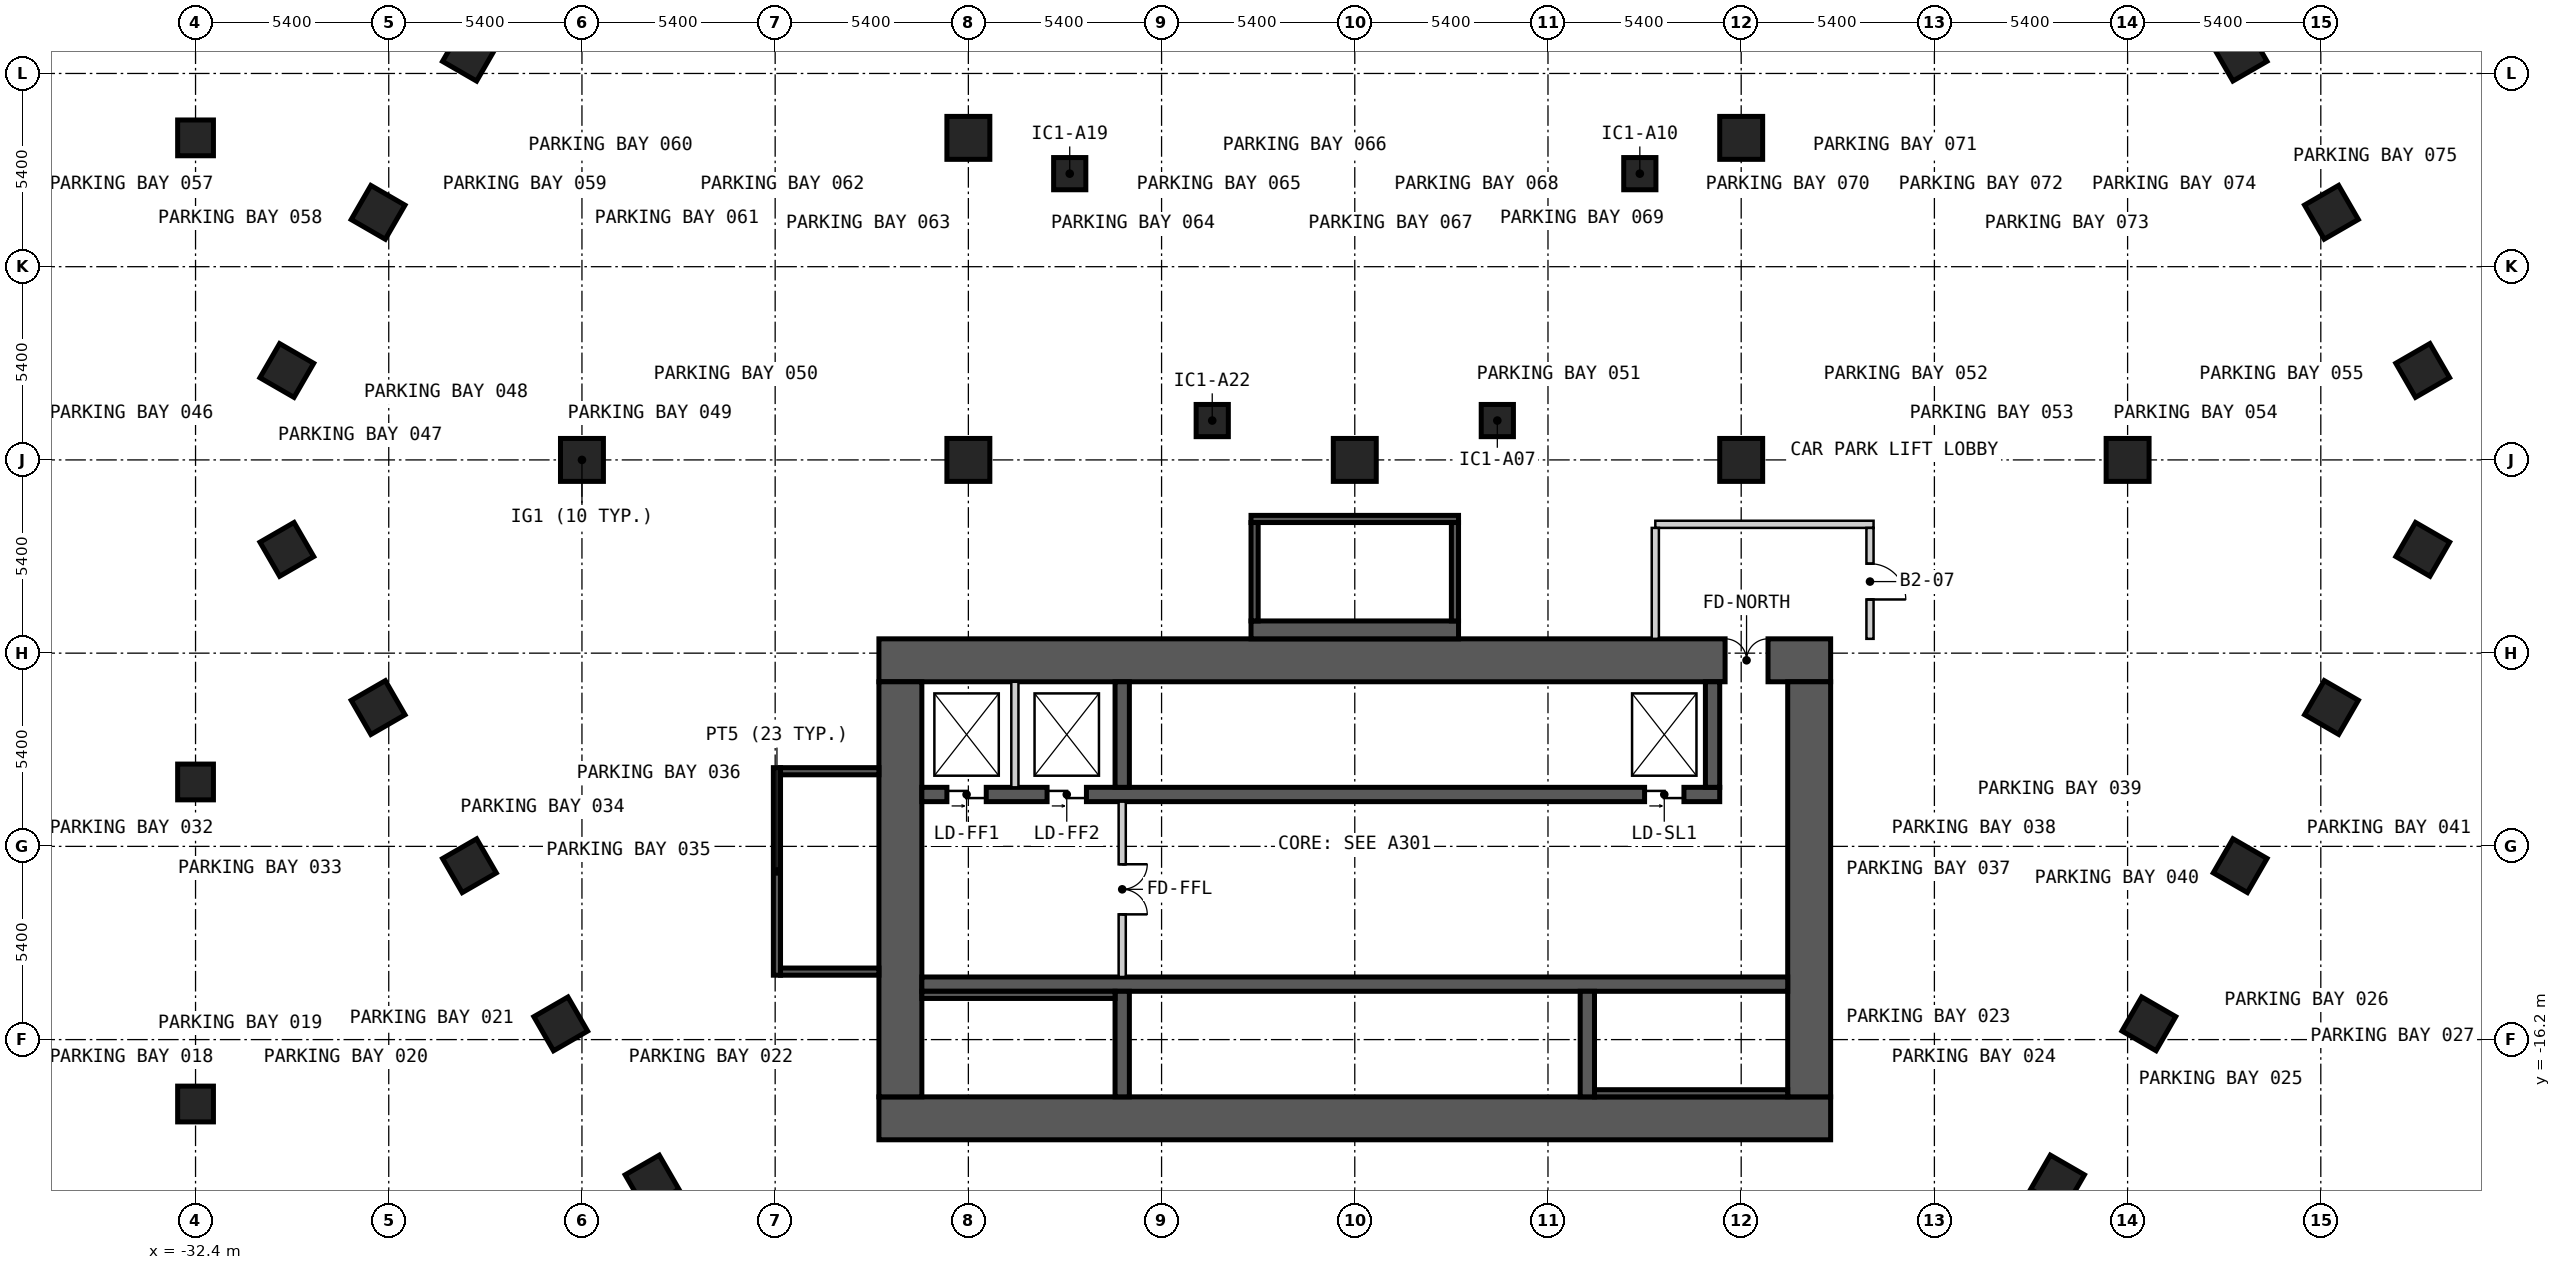
"""IFC4 building model, lengths in metres.
Left out: names, types, materials, properties, quantities, classifications, styles, units other than length and angle.
Written with IfcOpenShell. Run it as: python <this file> out.ifc"""

import sys

from ifc_helpers import new_model, si_unit, direction, frame, frame_2d, origin, origin_2d, place, context, subcontext, project, spatial, rectangle, extrude, element, fill, save


model = new_model("IFC4")
c1 = context("Model", 3, precision=1e-05, world=origin(), true_north=direction((0.0, 1.0)))
c2 = subcontext(c1, "Body", "Model", "MODEL_VIEW")
j1 = project(units=[si_unit("LENGTHUNIT", "METRE"), si_unit("PLANEANGLEUNIT", "RADIAN")], contexts=[c1])
p1 = place(None, origin())
s1 = spatial("IfcSite", under=j1, at=p1, CompositionType="ELEMENT")
p2 = place(p1, origin())
s2 = spatial("IfcBuilding", under=s1, at=p2, CompositionType="ELEMENT")
p3 = place(p2, frame((0.0, 0.0, -8.4)))
s3 = spatial("IfcBuildingStorey", under=s2, at=p3, CompositionType="ELEMENT", Elevation=-8.4)
for number, where, z_axis, x_axis in (
    (1, (-24.746, 11.339, -0.35), (0.0, 0.0, 1.0), (-0.5, -0.866, 0.0)),
    (2, (-27.298, 6.919, -0.35), (0.0, 0.0, 1.0), (-0.5, -0.866, 0.0)),
    (3, (-29.849, 2.499, -0.35), (0.0, 0.0, 1.0), (-0.5, -0.866, 0.0)),
    (4, (-29.848, -2.5, -0.35), (0.0, 0.0, 1.0), (0.5, -0.866, 0.0)),
    (5, (-27.297, -6.921, -0.35), (0.0, 0.0, 1.0), (0.5, -0.866, 0.0)),
    (6, (-24.745, -11.341, -0.35), (0.0, 0.0, 1.0), (0.5, -0.866, 0.0)),
    (7, (-22.193, -15.761, -0.35), (0.0, 0.0, 1.0), (0.5, -0.866, 0.0)),
    (8, (-19.641, -20.181, -0.35), (0.0, 0.0, 1.0), (0.5, -0.866, 0.0)),
    (9, (19.642, -20.18, -0.35), (0.0, 0.0, 1.0), (0.5, 0.866, 0.0)),
    (10, (22.194, -15.759, -0.35), (0.0, 0.0, 1.0), (0.5, 0.866, 0.0)),
    (11, (24.746, -11.339, -0.35), (0.0, 0.0, 1.0), (0.5, 0.866, 0.0)),
    (12, (27.298, -6.919, -0.35), (0.0, 0.0, 1.0), (0.5, 0.866, 0.0)),
    (13, (29.849, -2.499, -0.35), (0.0, 0.0, 1.0), (0.5, 0.866, 0.0)),
    (14, (29.848, 2.5, -0.35), (0.0, 0.0, 1.0), (-0.5, 0.866, 0.0)),
    (15, (27.297, 6.921, -0.35), (0.0, 0.0, 1.0), (-0.5, 0.866, 0.0)),
    (16, (24.745, 11.341, -0.35), (0.0, 0.0, 1.0), (-0.5, 0.866, 0.0)),
):
    element("IfcColumn", number, at=place(p3, frame(where, z_axis=z_axis, x_axis=x_axis)), inside=s3, PredefinedType="COLUMN", context=c2, shape_type="SweptSolid", body=[
        extrude(rectangle(XDim=1.1, YDim=1.1, at=origin_2d()), origin(), (0.0, 0.0, 1.0), 4.55),
    ])
for number, where, z_axis, x_axis in (
    (17, (3.984, 1.1, -0.35), (0.0, 0.0, 1.0), (1.0, 0.0, 0.0)),
    (18, (7.967, 8.0, -0.35), (0.0, 0.0, 1.0), (1.0, 0.0, 0.0)),
    (19, (-7.967, 8.0, -0.35), (0.0, 0.0, 1.0), (1.0, 0.0, 0.0)),
    (20, (-3.984, 1.1, -0.35), (0.0, 0.0, 1.0), (1.0, 0.0, 0.0)),
):
    element("IfcColumn", number, at=place(p3, frame(where, z_axis=z_axis, x_axis=x_axis)), inside=s3, PredefinedType="COLUMN", context=c2, shape_type="SweptSolid", body=[
        extrude(rectangle(XDim=0.9, YDim=0.9, at=origin_2d()), origin(), (0.0, 0.0, 1.0), 4.55),
    ])
for number, where, z_axis, x_axis in (
    (21, (-21.6, 0.0, -0.35), (0.0, 0.0, 1.0), (1.0, 0.0, 0.0)),
    (22, (-10.8, 0.0, -0.35), (0.0, 0.0, 1.0), (1.0, 0.0, 0.0)),
    (23, (-10.8, 9.0, -0.35), (0.0, 0.0, 1.0), (1.0, 0.0, 0.0)),
    (24, (0.0, 0.0, -0.35), (0.0, 0.0, 1.0), (1.0, 0.0, 0.0)),
    (25, (10.8, 0.0, -0.35), (0.0, 0.0, 1.0), (1.0, 0.0, 0.0)),
    (26, (10.8, 9.0, -0.35), (0.0, 0.0, 1.0), (1.0, 0.0, 0.0)),
    (27, (21.6, 0.0, -0.35), (0.0, 0.0, 1.0), (1.0, 0.0, 0.0)),
):
    element("IfcColumn", number, at=place(p3, frame(where, z_axis=z_axis, x_axis=x_axis)), inside=s3, PredefinedType="COLUMN", context=c2, shape_type="SweptSolid", body=[
        extrude(rectangle(XDim=1.2, YDim=1.2, at=origin_2d()), origin(), (0.0, 0.0, 1.0), 4.55),
    ])
for number, where, z_axis, x_axis in (
    (28, (-32.4, -18.0, -0.35), (0.0, 0.0, 1.0), (1.0, 0.0, 0.0)),
    (29, (-32.4, -9.0, -0.35), (0.0, 0.0, 1.0), (1.0, 0.0, 0.0)),
    (30, (-32.4, 9.0, -0.35), (0.0, 0.0, 1.0), (1.0, 0.0, 0.0)),
):
    element("IfcColumn", number, at=place(p3, frame(where, z_axis=z_axis, x_axis=x_axis)), inside=s3, PredefinedType="COLUMN", context=c2, shape_type="SweptSolid", body=[
        extrude(rectangle(XDim=1.0, YDim=1.0, at=origin_2d()), origin(), (0.0, 0.0, 1.0), 4.55),
    ])
p4 = place(p3, frame((-13.3, -18.4, 0.0), z_axis=(0.0, 0.0, 1.0), x_axis=(1.0, 0.0, 0.0)))
e31 = element("IfcWall", 31, at=p4, inside=s3, PredefinedType="SHEAR", context=c2, shape_type="SweptSolid", body=[
    extrude(rectangle(XDim=26.6, YDim=1.2, at=frame_2d((13.3, 0.0))), origin(), (0.0, 0.0, 1.0), 3.85),
])
p5 = place(p3, frame((-13.3, -5.6, 0.0), z_axis=(0.0, 0.0, 1.0), x_axis=(1.0, 0.0, 0.0)))
e32 = element("IfcWall", 32, at=p5, inside=s3, PredefinedType="SHEAR", context=c2, shape_type="SweptSolid", body=[
    extrude(rectangle(XDim=26.6, YDim=1.2, at=frame_2d((13.3, 0.0))), origin(), (0.0, 0.0, 1.0), 3.85),
])
p6 = place(p5, frame((23.65, 0.0, 0.0)))
e33 = element("IfcOpeningElement", 33, at=p6, cuts=e32, PredefinedType="OPENING", context=c2, shape_type="SweptSolid", body=[
    extrude(rectangle(XDim=1.2, YDim=2.1, at=frame_2d((0.6, 1.05))), frame((0.0, 0.61, 0.0), z_axis=(0.0, -1.0, 0.0), x_axis=(1.0, 0.0, 0.0)), (0.0, 0.0, 1.0), 1.22),
])
for number, where, z_axis, x_axis in (
    (34, (-12.7, -17.8, 0.0), (0.0, 0.0, 1.0), (0.0, 1.0, 0.0)),
    (35, (12.7, -17.8, 0.0), (0.0, 0.0, 1.0), (0.0, 1.0, 0.0)),
):
    element("IfcWall", number, at=place(p3, frame(where, z_axis=z_axis, x_axis=x_axis)), inside=s3, PredefinedType="SHEAR", context=c2, shape_type="SweptSolid", body=[
        extrude(rectangle(XDim=11.6, YDim=1.2, at=frame_2d((5.8, 0.0))), origin(), (0.0, 0.0, 1.0), 3.85),
    ])
p7 = place(p3, frame((-12.1, -14.65, 0.0), z_axis=(0.0, 0.0, 1.0), x_axis=(1.0, 0.0, 0.0)))
e36 = element("IfcWall", 36, at=p7, inside=s3, PredefinedType="SHEAR", context=c2, shape_type="SweptSolid", body=[
    extrude(rectangle(XDim=24.2, YDim=0.4, at=frame_2d((12.1, 0.0))), origin(), (0.0, 0.0, 1.0), 3.85),
])
p8 = place(p3, frame((-12.1, -9.35, 0.0), z_axis=(0.0, 0.0, 1.0), x_axis=(1.0, 0.0, 0.0)))
e37 = element("IfcWall", 37, at=p8, inside=s3, PredefinedType="SHEAR", context=c2, shape_type="SweptSolid", body=[
    extrude(rectangle(XDim=22.3, YDim=0.4, at=frame_2d((11.15, 0.0))), origin(), (0.0, 0.0, 1.0), 3.85),
])
p9 = place(p8, frame((0.7, 0.0, 0.0)))
e38 = element("IfcOpeningElement", 38, at=p9, cuts=e37, PredefinedType="OPENING", context=c2, shape_type="SweptSolid", body=[
    extrude(rectangle(XDim=1.1, YDim=2.1, at=frame_2d((0.55, 1.05))), frame((0.0, 0.21, 0.0), z_axis=(0.0, -1.0, 0.0), x_axis=(1.0, 0.0, 0.0)), (0.0, 0.0, 1.0), 0.42),
])
p10 = place(p8, frame((3.5, 0.0, 0.0)))
e39 = element("IfcOpeningElement", 39, at=p10, cuts=e37, PredefinedType="OPENING", context=c2, shape_type="SweptSolid", body=[
    extrude(rectangle(XDim=1.1, YDim=2.1, at=frame_2d((0.55, 1.05))), frame((0.0, 0.21, 0.0), z_axis=(0.0, -1.0, 0.0), x_axis=(1.0, 0.0, 0.0)), (0.0, 0.0, 1.0), 0.42),
])
p11 = place(p8, frame((20.2, 0.0, 0.0)))
e40 = element("IfcOpeningElement", 40, at=p11, cuts=e37, PredefinedType="OPENING", context=c2, shape_type="SweptSolid", body=[
    extrude(rectangle(XDim=1.1, YDim=2.1, at=frame_2d((0.55, 1.05))), frame((0.0, 0.21, 0.0), z_axis=(0.0, -1.0, 0.0), x_axis=(1.0, 0.0, 0.0)), (0.0, 0.0, 1.0), 0.42),
])
for number, where, z_axis, x_axis in (
    (41, (-6.5, -17.8, 0.0), (0.0, 0.0, 1.0), (0.0, 1.0, 0.0)),
    (42, (6.5, -17.8, 0.0), (0.0, 0.0, 1.0), (0.0, 1.0, 0.0)),
    (43, (-6.5, -9.15, 0.0), (0.0, 0.0, 1.0), (0.0, 1.0, 0.0)),
    (44, (10.0, -9.15, 0.0), (0.0, 0.0, 1.0), (0.0, 1.0, 0.0)),
):
    element("IfcWall", number, at=place(p3, frame(where, z_axis=z_axis, x_axis=x_axis)), inside=s3, PredefinedType="SHEAR", context=c2, shape_type="SweptSolid", body=[
        extrude(rectangle(XDim=2.95, YDim=0.4, at=frame_2d((1.475, 0.0))), origin(), (0.0, 0.0, 1.0), 3.85),
    ])
p12 = place(p3, frame((8.4, -1.8, 0.0), z_axis=(0.0, 0.0, 1.0), x_axis=(1.0, 0.0, 0.0)))
e45 = element("IfcWall", 45, at=p12, inside=s3, PredefinedType="PARTITIONING", context=c2, shape_type="SweptSolid", body=[
    extrude(rectangle(XDim=6.1, YDim=0.2, at=frame_2d((3.05, 0.0))), origin(), (0.0, 0.0, 1.0), 3.85),
])
p13 = place(p3, frame((8.4, -5.0, 0.0), z_axis=(0.0, 0.0, 1.0), x_axis=(0.0, 1.0, 0.0)))
e46 = element("IfcWall", 46, at=p13, inside=s3, PredefinedType="PARTITIONING", context=c2, shape_type="SweptSolid", body=[
    extrude(rectangle(XDim=3.1, YDim=0.2, at=frame_2d((1.55, 0.0))), origin(), (0.0, 0.0, 1.0), 3.85),
])
p14 = place(p3, frame((14.4, -5.0, 0.0), z_axis=(0.0, 0.0, 1.0), x_axis=(0.0, 1.0, 0.0)))
e47 = element("IfcWall", 47, at=p14, inside=s3, PredefinedType="PARTITIONING", context=c2, shape_type="SweptSolid", body=[
    extrude(rectangle(XDim=3.1, YDim=0.2, at=frame_2d((1.55, 0.0))), origin(), (0.0, 0.0, 1.0), 3.85),
])
p15 = place(p14, frame((2.1, 0.0, 0.0), z_axis=(0.0, 0.0, 1.0), x_axis=(-1.0, 0.0, 0.0)))
e48 = element("IfcOpeningElement", 48, at=p15, cuts=e47, PredefinedType="OPENING", context=c2, shape_type="SweptSolid", body=[
    extrude(rectangle(XDim=1.0, YDim=2.1, at=frame_2d((0.5, 1.05))), frame((0.0, 0.11, 0.0), z_axis=(0.0, -1.0, 0.0), x_axis=(1.0, 0.0, 0.0)), (0.0, 0.0, 1.0), 0.22),
])
p16 = place(p3, frame((-16.15, -14.4, 0.0), z_axis=(0.0, 0.0, 1.0), x_axis=(0.0, 1.0, 0.0)))
e49 = element("IfcWall", 49, at=p16, inside=s3, PredefinedType="SOLIDWALL", context=c2, shape_type="SweptSolid", body=[
    extrude(rectangle(XDim=5.8, YDim=0.2, at=frame_2d((2.9, 0.0))), origin(), (0.0, 0.0, 1.0), 3.85),
])
for number, where, z_axis, x_axis in (
    (50, (-16.05, -14.3, 0.0), (0.0, 0.0, 1.0), (1.0, 0.0, 0.0)),
    (51, (-16.05, -8.7, 0.0), (0.0, 0.0, 1.0), (1.0, 0.0, 0.0)),
):
    element("IfcWall", number, at=place(p3, frame(where, z_axis=z_axis, x_axis=x_axis)), inside=s3, PredefinedType="SOLIDWALL", context=c2, shape_type="SweptSolid", body=[
        extrude(rectangle(XDim=2.75, YDim=0.2, at=frame_2d((1.375, 0.0))), origin(), (0.0, 0.0, 1.0), 3.85),
    ])
p17 = place(p3, frame((-12.1, -14.95, 0.0), z_axis=(0.0, 0.0, 1.0), x_axis=(1.0, 0.0, 0.0)))
e52 = element("IfcWall", 52, at=p17, inside=s3, PredefinedType="SOLIDWALL", context=c2, shape_type="SweptSolid", body=[
    extrude(rectangle(XDim=5.4, YDim=0.2, at=frame_2d((2.7, 0.0))), origin(), (0.0, 0.0, 1.0), 3.85),
])
p18 = place(p3, frame((-9.5, -9.15, 0.0), z_axis=(0.0, 0.0, 1.0), x_axis=(0.0, 1.0, 0.0)))
e53 = element("IfcWall", 53, at=p18, inside=s3, PredefinedType="SOLIDWALL", context=c2, shape_type="SweptSolid", body=[
    extrude(rectangle(XDim=2.95, YDim=0.2, at=frame_2d((1.475, 0.0))), origin(), (0.0, 0.0, 1.0), 3.85),
])
p19 = place(p3, frame((-6.5, -14.45, 0.0), z_axis=(0.0, 0.0, 1.0), x_axis=(0.0, 1.0, 0.0)))
e54 = element("IfcWall", 54, at=p19, inside=s3, PredefinedType="PARTITIONING", context=c2, shape_type="SweptSolid", body=[
    extrude(rectangle(XDim=4.9, YDim=0.2, at=frame_2d((2.45, 0.0))), origin(), (0.0, 0.0, 1.0), 3.85),
])
p20 = place(p19, frame((3.15, 0.0, 0.0), z_axis=(0.0, 0.0, 1.0), x_axis=(-1.0, 0.0, 0.0)))
e55 = element("IfcOpeningElement", 55, at=p20, cuts=e54, PredefinedType="OPENING", context=c2, shape_type="SweptSolid", body=[
    extrude(rectangle(XDim=1.4, YDim=2.1, at=frame_2d((0.7, 1.05))), frame((0.0, 0.11, 0.0), z_axis=(0.0, -1.0, 0.0), x_axis=(1.0, 0.0, 0.0)), (0.0, 0.0, 1.0), 0.22),
])
p21 = place(p3, frame((6.7, -17.7, 0.0), z_axis=(0.0, 0.0, 1.0), x_axis=(1.0, 0.0, 0.0)))
e56 = element("IfcWall", 56, at=p21, inside=s3, PredefinedType="SOLIDWALL", context=c2, shape_type="SweptSolid", body=[
    extrude(rectangle(XDim=5.4, YDim=0.2, at=frame_2d((2.7, 0.0))), origin(), (0.0, 0.0, 1.0), 3.85),
])
p22 = place(p3, frame((-2.9, -4.75, 0.0), z_axis=(0.0, 0.0, 1.0), x_axis=(1.0, 0.0, 0.0)))
e57 = element("IfcWall", 57, at=p22, inside=s3, PredefinedType="SOLIDWALL", context=c2, shape_type="SweptSolid", body=[
    extrude(rectangle(XDim=5.8, YDim=0.5, at=frame_2d((2.9, 0.0))), origin(), (0.0, 0.0, 1.0), 3.85),
])
p23 = place(p3, frame((-2.9, -1.65, 0.0), z_axis=(0.0, 0.0, 1.0), x_axis=(1.0, 0.0, 0.0)))
e58 = element("IfcWall", 58, at=p23, inside=s3, PredefinedType="SOLIDWALL", context=c2, shape_type="SweptSolid", body=[
    extrude(rectangle(XDim=5.8, YDim=0.2, at=frame_2d((2.9, 0.0))), origin(), (0.0, 0.0, 1.0), 3.85),
])
for number, where, z_axis, x_axis in (
    (59, (-2.8, -4.5, 0.0), (0.0, 0.0, 1.0), (0.0, 1.0, 0.0)),
    (60, (2.8, -4.5, 0.0), (0.0, 0.0, 1.0), (0.0, 1.0, 0.0)),
):
    element("IfcWall", number, at=place(p3, frame(where, z_axis=z_axis, x_axis=x_axis)), inside=s3, PredefinedType="SOLIDWALL", context=c2, shape_type="SweptSolid", body=[
        extrude(rectangle(XDim=2.75, YDim=0.2, at=frame_2d((1.375, 0.0))), origin(), (0.0, 0.0, 1.0), 3.85),
    ])
p24 = place(p15, origin())
e61 = element("IfcDoor", 61, at=p24, inside=s3, OperationType="SINGLE_SWING_RIGHT", PredefinedType="DOOR", context=c2, shape_type="SweptSolid", body=[
    extrude(rectangle(XDim=1.0, YDim=2.1, at=frame_2d((0.5, 1.05))), frame((0.0, 0.025, 0.0), z_axis=(0.0, -1.0, 0.0), x_axis=(1.0, 0.0, 0.0)), (0.0, 0.0, 1.0), 0.05),
])
fill(e48, e61)
p25 = place(p9, origin())
e62 = element("IfcDoor", 62, at=p25, inside=s3, OperationType="DOUBLE_DOOR_SLIDING", PredefinedType="DOOR", context=c2, shape_type="SweptSolid", body=[
    extrude(rectangle(XDim=1.1, YDim=2.1, at=frame_2d((0.55, 1.05))), frame((0.0, 0.025, 0.0), z_axis=(0.0, -1.0, 0.0), x_axis=(1.0, 0.0, 0.0)), (0.0, 0.0, 1.0), 0.05),
])
fill(e38, e62)
p26 = place(p10, origin())
e63 = element("IfcDoor", 63, at=p26, inside=s3, OperationType="DOUBLE_DOOR_SLIDING", PredefinedType="DOOR", context=c2, shape_type="SweptSolid", body=[
    extrude(rectangle(XDim=1.1, YDim=2.1, at=frame_2d((0.55, 1.05))), frame((0.0, 0.025, 0.0), z_axis=(0.0, -1.0, 0.0), x_axis=(1.0, 0.0, 0.0)), (0.0, 0.0, 1.0), 0.05),
])
fill(e39, e63)
p27 = place(p11, origin())
e64 = element("IfcDoor", 64, at=p27, inside=s3, OperationType="DOUBLE_DOOR_SLIDING", PredefinedType="DOOR", context=c2, shape_type="SweptSolid", body=[
    extrude(rectangle(XDim=1.1, YDim=2.1, at=frame_2d((0.55, 1.05))), frame((0.0, 0.025, 0.0), z_axis=(0.0, -1.0, 0.0), x_axis=(1.0, 0.0, 0.0)), (0.0, 0.0, 1.0), 0.05),
])
fill(e40, e64)
p28 = place(p20, origin())
e65 = element("IfcDoor", 65, at=p28, inside=s3, OperationType="DOUBLE_DOOR_SINGLE_SWING", PredefinedType="DOOR", context=c2, shape_type="SweptSolid", body=[
    extrude(rectangle(XDim=1.4, YDim=2.1, at=frame_2d((0.7, 1.05))), frame((0.0, 0.025, 0.0), z_axis=(0.0, -1.0, 0.0), x_axis=(1.0, 0.0, 0.0)), (0.0, 0.0, 1.0), 0.05),
])
fill(e55, e65)
p29 = place(p6, origin())
e66 = element("IfcDoor", 66, at=p29, inside=s3, OperationType="DOUBLE_DOOR_SINGLE_SWING", PredefinedType="DOOR", context=c2, shape_type="SweptSolid", body=[
    extrude(rectangle(XDim=1.2, YDim=2.1, at=frame_2d((0.6, 1.05))), frame((0.0, 0.025, 0.0), z_axis=(0.0, -1.0, 0.0), x_axis=(1.0, 0.0, 0.0)), (0.0, 0.0, 1.0), 0.05),
])
fill(e33, e66)
save(model, sys.argv[1])
